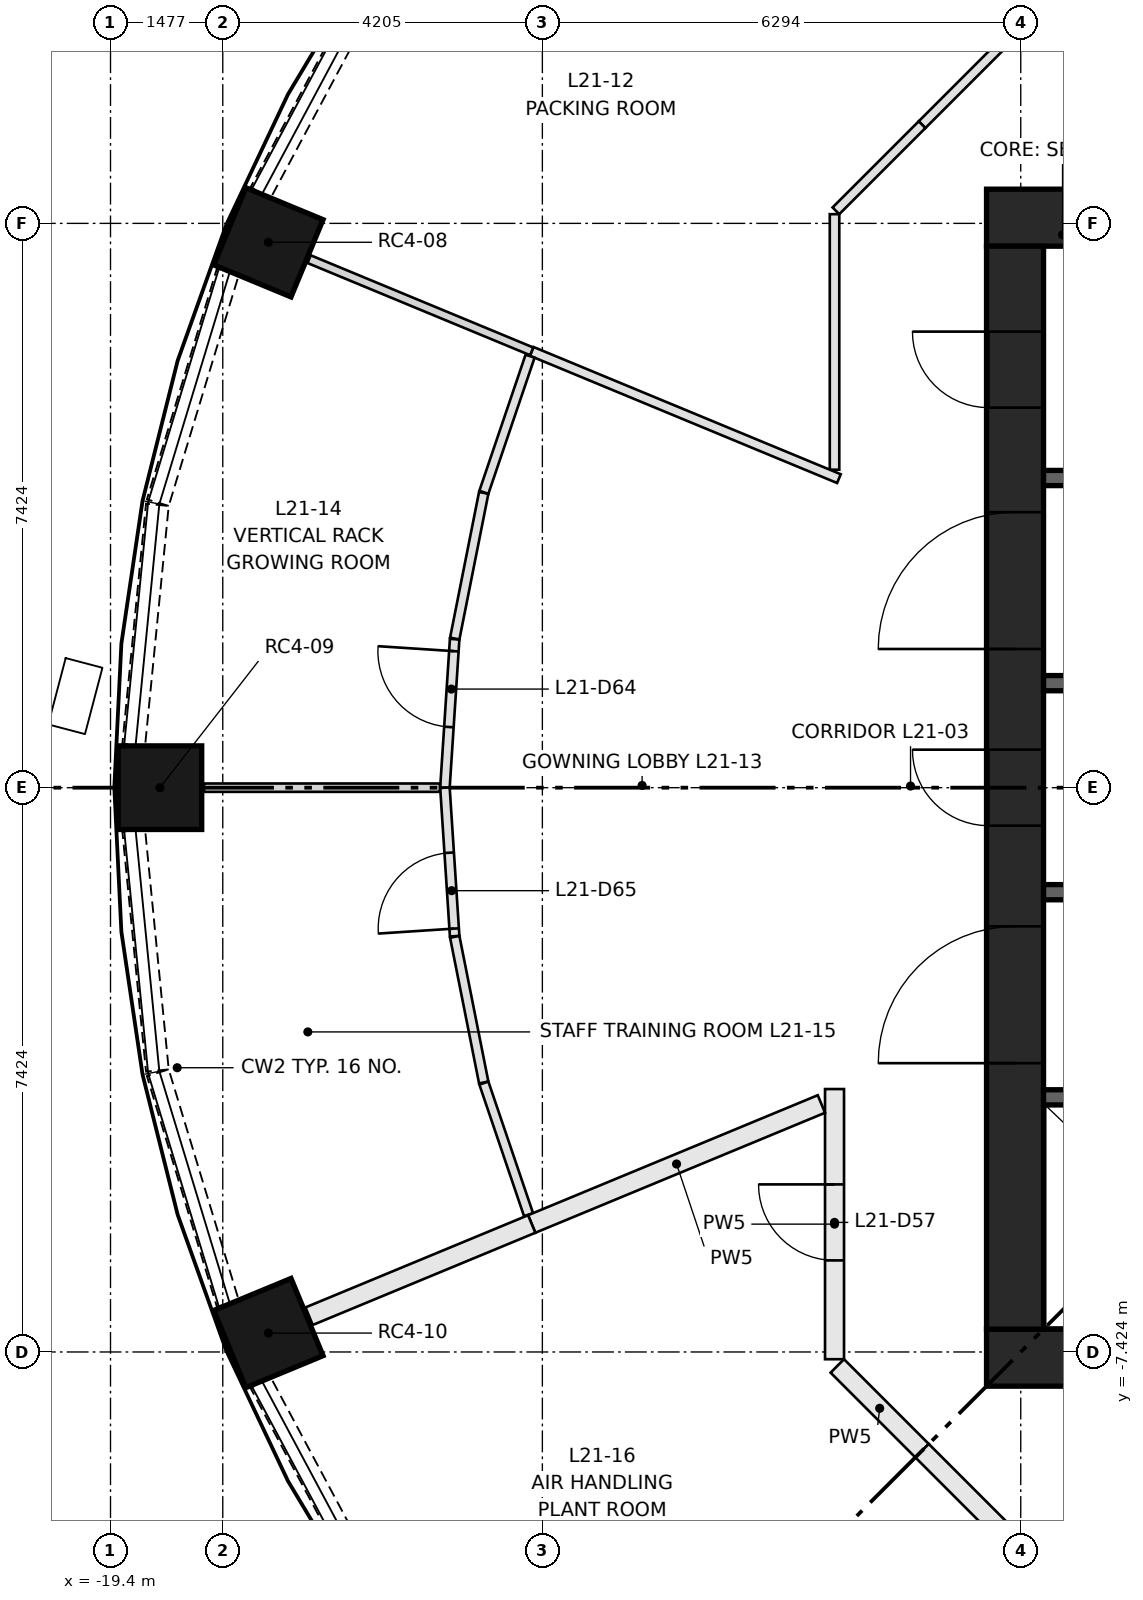
"""IFC4 building model, lengths in metres.
Left out: names, types, materials, properties, quantities, classifications, styles, units other than length and angle.
Written with IfcOpenShell. Run it as: python <this file> out.ifc"""

import sys

from ifc_helpers import new_model, si_unit, direction, frame, frame_2d, origin, origin_2d, place, context, subcontext, project, spatial, rectangle, extrude, element, fill, save


model = new_model("IFC4")
c1 = context("Model", 3, precision=1e-05, world=origin(), true_north=direction((0.0, 1.0)))
c2 = subcontext(c1, "Body", "Model", "MODEL_VIEW")
j1 = project(units=[si_unit("LENGTHUNIT", "METRE"), si_unit("PLANEANGLEUNIT", "RADIAN")], contexts=[c1])
p1 = place(None, origin())
s1 = spatial("IfcSite", under=j1, at=p1, CompositionType="ELEMENT")
p2 = place(p1, origin())
s2 = spatial("IfcBuilding", under=s1, at=p2, CompositionType="ELEMENT")
p3 = place(p2, frame((0.0, 0.0, 83.7)))
s3 = spatial("IfcBuildingStorey", under=s2, at=p3, CompositionType="ELEMENT", Elevation=83.7)
for number, where, z_axis, x_axis in (
    (1, (-17.323, 7.175, 0.0), (0.0, 0.0, 1.0), (-0.924, 0.383, 0.0)),
    (2, (-18.75, 0.0, 0.0), (0.0, 0.0, 1.0), (-1.0, 0.0, 0.0)),
    (3, (-17.323, -7.175, 0.0), (0.0, 0.0, 1.0), (-0.924, -0.383, 0.0)),
):
    element("IfcColumn", number, at=place(p3, frame(where, z_axis=z_axis, x_axis=x_axis)), inside=s3, PredefinedType="COLUMN", context=c2, shape_type="SweptSolid", body=[
        extrude(rectangle(XDim=1.1, YDim=1.1, at=origin_2d()), origin(), (0.0, 0.0, 1.0), 3.65),
    ])
for number, where, z_axis, x_axis in (
    (4, (-7.874, -7.499, 0.0), (0.0, 0.0, 1.0), (1.0, 0.0, 0.0)),
    (5, (-7.874, 7.499, 0.0), (0.0, 0.0, 1.0), (1.0, 0.0, 0.0)),
):
    element("IfcWall", number, at=place(p3, frame(where, z_axis=z_axis, x_axis=x_axis)), inside=s3, PredefinedType="SHEAR", context=c2, shape_type="SweptSolid", body=[
        extrude(rectangle(XDim=15.748, YDim=0.75, at=frame_2d((7.874, 0.0))), origin(), (0.0, 0.0, 1.0), 3.65),
    ])
p4 = place(p3, frame((-7.499, -7.124, 0.0), z_axis=(0.0, 0.0, 1.0), x_axis=(0.0, 1.0, 0.0)))
e6 = element("IfcWall", 6, at=p4, inside=s3, PredefinedType="SHEAR", context=c2, shape_type="SweptSolid", body=[
    extrude(rectangle(XDim=14.248, YDim=0.75, at=frame_2d((7.124, 0.0))), origin(), (0.0, 0.0, 1.0), 3.65),
])
p5 = place(p4, frame((6.624, 0.0, 0.0)))
e7 = element("IfcOpeningElement", 7, at=p5, cuts=e6, PredefinedType="OPENING", context=c2, shape_type="SweptSolid", body=[
    extrude(rectangle(XDim=1.0, YDim=2.1, at=frame_2d((0.5, 1.05))), frame((0.0, 0.385, 0.0), z_axis=(0.0, -1.0, 0.0), x_axis=(1.0, 0.0, 0.0)), (0.0, 0.0, 1.0), 0.77),
])
p6 = place(p4, frame((3.5, 0.0, 0.0)))
e8 = element("IfcOpeningElement", 8, at=p6, cuts=e6, PredefinedType="OPENING", context=c2, shape_type="SweptSolid", body=[
    extrude(rectangle(XDim=1.8, YDim=2.1, at=frame_2d((0.9, 1.05))), frame((0.0, 0.385, 0.0), z_axis=(0.0, -1.0, 0.0), x_axis=(1.0, 0.0, 0.0)), (0.0, 0.0, 1.0), 0.77),
])
p7 = place(p4, frame((8.948, 0.0, 0.0)))
e9 = element("IfcOpeningElement", 9, at=p7, cuts=e6, PredefinedType="OPENING", context=c2, shape_type="SweptSolid", body=[
    extrude(rectangle(XDim=1.8, YDim=2.1, at=frame_2d((0.9, 1.05))), frame((0.0, 0.385, 0.0), z_axis=(0.0, -1.0, 0.0), x_axis=(1.0, 0.0, 0.0)), (0.0, 0.0, 1.0), 0.77),
])
p8 = place(p4, frame((12.124, 0.0, 0.0)))
e10 = element("IfcOpeningElement", 10, at=p8, cuts=e6, PredefinedType="OPENING", context=c2, shape_type="SweptSolid", body=[
    extrude(rectangle(XDim=1.0, YDim=2.1, at=frame_2d((0.5, 1.05))), frame((0.0, 0.385, 0.0), z_axis=(0.0, -1.0, 0.0), x_axis=(1.0, 0.0, 0.0)), (0.0, 0.0, 1.0), 0.77),
])
p9 = place(p3, frame((-7.124, -4.074, 0.0), z_axis=(0.0, 0.0, 1.0), x_axis=(1.0, 0.0, 0.0)))
e11 = element("IfcWall", 11, at=p9, inside=s3, PredefinedType="SHEAR", context=c2, shape_type="SweptSolid", body=[
    extrude(rectangle(XDim=14.248, YDim=0.2, at=frame_2d((7.124, 0.0))), origin(), (0.0, 0.0, 1.0), 3.3),
])
p10 = place(p9, frame((1.069, 0.0, 0.0)))
e12 = element("IfcOpeningElement", 12, at=p10, cuts=e11, PredefinedType="OPENING", context=c2, shape_type="SweptSolid", body=[
    extrude(rectangle(XDim=1.1, YDim=2.1, at=frame_2d((0.55, 1.05))), frame((0.0, 0.11, 0.0), z_axis=(0.0, -1.0, 0.0), x_axis=(1.0, 0.0, 0.0)), (0.0, 0.0, 1.0), 0.22),
])
p11 = place(p9, frame((4.206, 0.0, 0.0)))
e13 = element("IfcOpeningElement", 13, at=p11, cuts=e11, PredefinedType="OPENING", context=c2, shape_type="SweptSolid", body=[
    extrude(rectangle(XDim=1.1, YDim=2.1, at=frame_2d((0.55, 1.05))), frame((0.0, 0.11, 0.0), z_axis=(0.0, -1.0, 0.0), x_axis=(1.0, 0.0, 0.0)), (0.0, 0.0, 1.0), 0.22),
])
p12 = place(p9, frame((6.808, 0.0, 0.0)))
e14 = element("IfcOpeningElement", 14, at=p12, cuts=e11, PredefinedType="OPENING", context=c2, shape_type="SweptSolid", body=[
    extrude(rectangle(XDim=1.0, YDim=2.1, at=frame_2d((0.5, 1.05))), frame((0.0, 0.11, 0.0), z_axis=(0.0, -1.0, 0.0), x_axis=(1.0, 0.0, 0.0)), (0.0, 0.0, 1.0), 0.22),
])
p13 = place(p9, frame((8.777, 0.0, 0.0)))
e15 = element("IfcOpeningElement", 15, at=p13, cuts=e11, PredefinedType="OPENING", context=c2, shape_type="SweptSolid", body=[
    extrude(rectangle(XDim=1.0, YDim=2.1, at=frame_2d((0.5, 1.05))), frame((0.0, 0.11, 0.0), z_axis=(0.0, -1.0, 0.0), x_axis=(1.0, 0.0, 0.0)), (0.0, 0.0, 1.0), 0.22),
])
p14 = place(p9, frame((10.745, 0.0, 0.0)))
e16 = element("IfcOpeningElement", 16, at=p14, cuts=e11, PredefinedType="OPENING", context=c2, shape_type="SweptSolid", body=[
    extrude(rectangle(XDim=1.0, YDim=2.1, at=frame_2d((0.5, 1.05))), frame((0.0, 0.11, 0.0), z_axis=(0.0, -1.0, 0.0), x_axis=(1.0, 0.0, 0.0)), (0.0, 0.0, 1.0), 0.22),
])
p15 = place(p9, frame((12.714, 0.0, 0.0)))
e17 = element("IfcOpeningElement", 17, at=p15, cuts=e11, PredefinedType="OPENING", context=c2, shape_type="SweptSolid", body=[
    extrude(rectangle(XDim=1.0, YDim=2.1, at=frame_2d((0.5, 1.05))), frame((0.0, 0.11, 0.0), z_axis=(0.0, -1.0, 0.0), x_axis=(1.0, 0.0, 0.0)), (0.0, 0.0, 1.0), 0.22),
])
p16 = place(p3, frame((-7.124, 4.074, 0.0), z_axis=(0.0, 0.0, 1.0), x_axis=(1.0, 0.0, 0.0)))
e18 = element("IfcWall", 18, at=p16, inside=s3, PredefinedType="SHEAR", context=c2, shape_type="SweptSolid", body=[
    extrude(rectangle(XDim=7.124, YDim=0.2, at=frame_2d((3.562, 0.0))), origin(), (0.0, 0.0, 1.0), 3.3),
])
for number, where, z_axis, x_axis in (
    (19, (-7.124, -1.375, 0.0), (0.0, 0.0, 1.0), (1.0, 0.0, 0.0)),
    (20, (-7.124, 1.375, 0.0), (0.0, 0.0, 1.0), (1.0, 0.0, 0.0)),
):
    element("IfcWall", number, at=place(p3, frame(where, z_axis=z_axis, x_axis=x_axis)), inside=s3, PredefinedType="SHEAR", context=c2, shape_type="SweptSolid", body=[
        extrude(rectangle(XDim=2.75, YDim=0.2, at=frame_2d((1.375, 0.0))), origin(), (0.0, 0.0, 1.0), 3.3),
    ])
p17 = place(p3, frame((-15.929, 10.626, 0.0), z_axis=(0.0, 0.0, 1.0), x_axis=(-0.471458802606, -0.88188808669, 0.0)))
e21 = element("IfcWall", 21, at=p17, inside=s3, PredefinedType="SOLIDWALL", context=c2, shape_type="SweptSolid", body=[
    extrude(rectangle(XDim=3.172, YDim=0.3, at=frame_2d((1.586, 0.0))), origin(), (0.0, 0.0, 1.0), 0.9),
])
p18 = place(p3, frame((-17.856, 6.787, 0.0), z_axis=(0.0, 0.0, 1.0), x_axis=(-0.290325591482, -0.956927923582, 0.0)))
e22 = element("IfcWall", 22, at=p18, inside=s3, PredefinedType="SOLIDWALL", context=c2, shape_type="SweptSolid", body=[
    extrude(rectangle(XDim=3.173, YDim=0.3, at=frame_2d((1.586, 0.0))), origin(), (0.0, 0.0, 1.0), 0.9),
])
for number, where, z_axis, x_axis in (
    (23, (-18.783, 3.721, 0.0), (0.0, 0.0, 1.0), (-0.098, -0.995, 0.0)),
    (24, (-19.094, -0.564, 0.0), (0.0, 0.0, 1.0), (0.098, -0.995, 0.0)),
):
    element("IfcWall", number, at=place(p3, frame(where, z_axis=z_axis, x_axis=x_axis)), inside=s3, PredefinedType="SOLIDWALL", context=c2, shape_type="SweptSolid", body=[
        extrude(rectangle(XDim=3.173, YDim=0.3, at=frame_2d((1.586, 0.0))), origin(), (0.0, 0.0, 1.0), 0.9),
    ])
p19 = place(p3, frame((-18.778, -3.75, 0.0), z_axis=(0.0, 0.0, 1.0), x_axis=(0.290325591482, -0.956927923582, 0.0)))
e25 = element("IfcWall", 25, at=p19, inside=s3, PredefinedType="SOLIDWALL", context=c2, shape_type="SweptSolid", body=[
    extrude(rectangle(XDim=3.173, YDim=0.3, at=frame_2d((1.586, 0.0))), origin(), (0.0, 0.0, 1.0), 0.9),
])
p20 = place(p3, frame((-17.425, -7.828, 0.0), z_axis=(0.0, 0.0, 1.0), x_axis=(0.471458802606, -0.88188808669, 0.0)))
e26 = element("IfcWall", 26, at=p20, inside=s3, PredefinedType="SOLIDWALL", context=c2, shape_type="SweptSolid", body=[
    extrude(rectangle(XDim=3.172, YDim=0.3, at=frame_2d((1.586, 0.0))), origin(), (0.0, 0.0, 1.0), 0.9),
])
p21 = place(p3, frame((-8.722, 8.722, 0.0), z_axis=(0.0, 0.0, 1.0), x_axis=(0.707030604857, 0.70718294931, 0.0)))
e27 = element("IfcWall", 27, at=p21, inside=s3, PredefinedType="PARTITIONING", context=c2, shape_type="SweptSolid", body=[
    extrude(rectangle(XDim=1.603, YDim=0.125, at=frame_2d((0.801, 0.0))), origin(), (0.0, 0.0, 1.0), 3.3),
])
p22 = place(p3, frame((-9.874, 4.183, 0.0), z_axis=(0.0, 0.0, 1.0), x_axis=(0.0, 1.0, 0.0)))
e28 = element("IfcWall", 28, at=p22, inside=s3, PredefinedType="PARTITIONING", context=c2, shape_type="SweptSolid", body=[
    extrude(rectangle(XDim=3.362, YDim=0.125, at=frame_2d((1.681, 0.0))), origin(), (0.0, 0.0, 1.0), 3.3),
])
p23 = place(p3, frame((-9.856, 7.589, 0.0), z_axis=(0.0, 0.0, 1.0), x_axis=(0.70718294931, 0.707030604857, 0.0)))
e29 = element("IfcWall", 29, at=p23, inside=s3, PredefinedType="PARTITIONING", context=c2, shape_type="SweptSolid", body=[
    extrude(rectangle(XDim=1.603, YDim=0.125, at=frame_2d((0.801, 0.0))), origin(), (0.0, 0.0, 1.0), 3.3),
])
p24 = place(p3, frame((-9.874, -7.519, 0.0), z_axis=(0.0, 0.0, 1.0), x_axis=(0.0, 1.0, 0.0)))
e30 = element("IfcWall", 30, at=p24, inside=s3, PredefinedType="PARTITIONING", context=c2, shape_type="SweptSolid", body=[
    extrude(rectangle(XDim=3.554, YDim=0.25, at=frame_2d((1.777, 0.0))), origin(), (0.0, 0.0, 1.0), 3.3),
])
p25 = place(p24, frame((1.3, 0.0, 0.0)))
e31 = element("IfcOpeningElement", 31, at=p25, cuts=e30, PredefinedType="OPENING", context=c2, shape_type="SweptSolid", body=[
    extrude(rectangle(XDim=1.0, YDim=2.1, at=frame_2d((0.5, 1.05))), frame((0.0, 0.135, 0.0), z_axis=(0.0, -1.0, 0.0), x_axis=(1.0, 0.0, 0.0)), (0.0, 0.0, 1.0), 0.27),
])
for number, where, z_axis, x_axis in (
    (32, (-8.722, -8.722, 0.0), (0.0, 0.0, 1.0), (-0.707, 0.707, 0.0)),
    (33, (-7.608, -9.837, 0.0), (0.0, 0.0, 1.0), (-0.707, 0.707, 0.0)),
):
    element("IfcWall", number, at=place(p3, frame(where, z_axis=z_axis, x_axis=x_axis)), inside=s3, PredefinedType="PARTITIONING", context=c2, shape_type="SweptSolid", body=[
        extrude(rectangle(XDim=1.577, YDim=0.25, at=frame_2d((0.788, 0.0))), origin(), (0.0, 0.0, 1.0), 3.3),
    ])
p26 = place(p3, frame((-9.816, 4.066, 0.0), z_axis=(0.0, 0.0, 1.0), x_axis=(-0.923865829688, 0.382716512232, 0.0)))
e34 = element("IfcWall", 34, at=p26, inside=s3, PredefinedType="PARTITIONING", context=c2, shape_type="SweptSolid", body=[
    extrude(rectangle(XDim=4.375, YDim=0.125, at=frame_2d((2.188, 0.0))), origin(), (0.0, 0.0, 1.0), 3.3),
])
p27 = place(p3, frame((-13.858, 5.74, 0.0), z_axis=(0.0, 0.0, 1.0), x_axis=(-0.923876970079, 0.382689618566, 0.0)))
e35 = element("IfcWall", 35, at=p27, inside=s3, PredefinedType="PARTITIONING", context=c2, shape_type="SweptSolid", body=[
    extrude(rectangle(XDim=3.17, YDim=0.11, at=frame_2d((1.585, 0.0))), origin(), (0.0, 0.0, 1.0), 3.3),
])
p28 = place(p3, frame((-15.0, 0.0, 0.0), z_axis=(0.0, 0.0, 1.0), x_axis=(0.065335548621, 0.997863350407, 0.0)))
e36 = element("IfcWall", 36, at=p28, inside=s3, PredefinedType="PARTITIONING", context=c2, shape_type="SweptSolid", body=[
    extrude(rectangle(XDim=1.958, YDim=0.125, at=frame_2d((0.979, 0.0))), origin(), (0.0, 0.0, 1.0), 3.3),
])
p29 = place(p28, frame((0.8, 0.0, 0.0)))
e37 = element("IfcOpeningElement", 37, at=p29, cuts=e36, PredefinedType="OPENING", context=c2, shape_type="SweptSolid", body=[
    extrude(rectangle(XDim=1.0, YDim=2.1, at=frame_2d((0.5, 1.05))), frame((0.0, 0.073, 0.0), z_axis=(0.0, -1.0, 0.0), x_axis=(1.0, 0.0, 0.0)), (0.0, 0.0, 1.0), 0.145),
])
p30 = place(p3, frame((-14.871, 1.962, 0.0), z_axis=(0.0, 0.0, 1.0), x_axis=(0.195034785279, 0.980796325713, 0.0)))
e38 = element("IfcWall", 38, at=p30, inside=s3, PredefinedType="PARTITIONING", context=c2, shape_type="SweptSolid", body=[
    extrude(rectangle(XDim=1.954, YDim=0.125, at=frame_2d((0.977, 0.0))), origin(), (0.0, 0.0, 1.0), 3.3),
])
p31 = place(p3, frame((-14.488, 3.886, 0.0), z_axis=(0.0, 0.0, 1.0), x_axis=(0.321451389675, 0.946926081633, 0.0)))
e39 = element("IfcWall", 39, at=p31, inside=s3, PredefinedType="PARTITIONING", context=c2, shape_type="SweptSolid", body=[
    extrude(rectangle(XDim=1.891, YDim=0.125, at=frame_2d((0.946, 0.0))), origin(), (0.0, 0.0, 1.0), 3.3),
])
p32 = place(p3, frame((-14.872, -1.954, 0.0), z_axis=(0.0, 0.0, 1.0), x_axis=(-0.065335548621, 0.997863350407, 0.0)))
e40 = element("IfcWall", 40, at=p32, inside=s3, PredefinedType="PARTITIONING", context=c2, shape_type="SweptSolid", body=[
    extrude(rectangle(XDim=1.958, YDim=0.125, at=frame_2d((0.979, 0.0))), origin(), (0.0, 0.0, 1.0), 3.3),
])
p33 = place(p32, frame((0.1, 0.0, 0.0)))
e41 = element("IfcOpeningElement", 41, at=p33, cuts=e40, PredefinedType="OPENING", context=c2, shape_type="SweptSolid", body=[
    extrude(rectangle(XDim=1.0, YDim=2.1, at=frame_2d((0.5, 1.05))), frame((0.0, 0.073, 0.0), z_axis=(0.0, -1.0, 0.0), x_axis=(1.0, 0.0, 0.0)), (0.0, 0.0, 1.0), 0.145),
])
p34 = place(p3, frame((-14.49, -3.878, 0.0), z_axis=(0.0, 0.0, 1.0), x_axis=(-0.195034785279, 0.980796325713, 0.0)))
e42 = element("IfcWall", 42, at=p34, inside=s3, PredefinedType="PARTITIONING", context=c2, shape_type="SweptSolid", body=[
    extrude(rectangle(XDim=1.954, YDim=0.125, at=frame_2d((0.977, 0.0))), origin(), (0.0, 0.0, 1.0), 3.3),
])
p35 = place(p3, frame((-13.9, -5.618, 0.0), z_axis=(0.0, 0.0, 1.0), x_axis=(-0.321390424162, 0.946946775303, 0.0)))
e43 = element("IfcWall", 43, at=p35, inside=s3, PredefinedType="PARTITIONING", context=c2, shape_type="SweptSolid", body=[
    extrude(rectangle(XDim=1.828, YDim=0.125, at=frame_2d((0.914, 0.0))), origin(), (0.0, 0.0, 1.0), 3.3),
])
p36 = place(p3, frame((-10.047, -4.162, 0.0), z_axis=(0.0, 0.0, 1.0), x_axis=(-0.92388555685, -0.382668888001, 0.0)))
e44 = element("IfcWall", 44, at=p36, inside=s3, PredefinedType="PARTITIONING", context=c2, shape_type="SweptSolid", body=[
    extrude(rectangle(XDim=4.125, YDim=0.25, at=frame_2d((2.062, 0.0))), origin(), (0.0, 0.0, 1.0), 3.3),
])
p37 = place(p3, frame((-15.066, 0.0, 0.0), z_axis=(0.0, 0.0, 1.0), x_axis=(-1.0, 0.0, 0.0)))
e45 = element("IfcWall", 45, at=p37, inside=s3, PredefinedType="PARTITIONING", context=c2, shape_type="SweptSolid", body=[
    extrude(rectangle(XDim=3.104, YDim=0.11, at=frame_2d((1.552, 0.0))), origin(), (0.0, 0.0, 1.0), 3.3),
])
p38 = place(p3, frame((-13.858, -5.74, 0.0), z_axis=(0.0, 0.0, 1.0), x_axis=(-0.923876970079, -0.382689618566, 0.0)))
e46 = element("IfcWall", 46, at=p38, inside=s3, PredefinedType="PARTITIONING", context=c2, shape_type="SweptSolid", body=[
    extrude(rectangle(XDim=3.17, YDim=0.25, at=frame_2d((1.585, 0.0))), origin(), (0.0, 0.0, 1.0), 3.3),
])
p39 = place(p5, origin())
e47 = element("IfcDoor", 47, at=p39, inside=s3, OperationType="SINGLE_SWING_RIGHT", PredefinedType="DOOR", context=c2, shape_type="SweptSolid", body=[
    extrude(rectangle(XDim=1.0, YDim=2.1, at=frame_2d((0.5, 1.05))), frame((0.0, 0.375, 0.0), z_axis=(0.0, -1.0, 0.0), x_axis=(1.0, 0.0, 0.0)), (0.0, 0.0, 1.0), 0.05),
])
fill(e7, e47)
p40 = place(p6, origin())
e48 = element("IfcDoor", 48, at=p40, inside=s3, OperationType="DOUBLE_DOOR_SINGLE_SWING", PredefinedType="DOOR", context=c2, shape_type="SweptSolid", body=[
    extrude(rectangle(XDim=1.8, YDim=2.1, at=frame_2d((0.9, 1.05))), frame((0.0, 0.025, 0.0), z_axis=(0.0, -1.0, 0.0), x_axis=(1.0, 0.0, 0.0)), (0.0, 0.0, 1.0), 0.05),
])
fill(e8, e48)
p41 = place(p7, origin())
e49 = element("IfcDoor", 49, at=p41, inside=s3, OperationType="DOUBLE_DOOR_SINGLE_SWING", PredefinedType="DOOR", context=c2, shape_type="SweptSolid", body=[
    extrude(rectangle(XDim=1.8, YDim=2.1, at=frame_2d((0.9, 1.05))), frame((0.0, 0.025, 0.0), z_axis=(0.0, -1.0, 0.0), x_axis=(1.0, 0.0, 0.0)), (0.0, 0.0, 1.0), 0.05),
])
fill(e9, e49)
p42 = place(p8, origin())
e50 = element("IfcDoor", 50, at=p42, inside=s3, OperationType="SINGLE_SWING_RIGHT", PredefinedType="DOOR", context=c2, shape_type="SweptSolid", body=[
    extrude(rectangle(XDim=1.0, YDim=2.1, at=frame_2d((0.5, 1.05))), frame((0.0, 0.375, 0.0), z_axis=(0.0, -1.0, 0.0), x_axis=(1.0, 0.0, 0.0)), (0.0, 0.0, 1.0), 0.05),
])
fill(e10, e50)
p43 = place(p25, origin())
e51 = element("IfcDoor", 51, at=p43, inside=s3, OperationType="SINGLE_SWING_RIGHT", PredefinedType="DOOR", context=c2, shape_type="SweptSolid", body=[
    extrude(rectangle(XDim=1.0, YDim=2.1, at=frame_2d((0.5, 1.05))), frame((0.0, 0.025, 0.0), z_axis=(0.0, -1.0, 0.0), x_axis=(1.0, 0.0, 0.0)), (0.0, 0.0, 1.0), 0.05),
])
fill(e31, e51)
p44 = place(p29, origin())
e52 = element("IfcDoor", 52, at=p44, inside=s3, OperationType="SINGLE_SWING_RIGHT", PredefinedType="DOOR", context=c2, shape_type="SweptSolid", body=[
    extrude(rectangle(XDim=1.0, YDim=2.1, at=frame_2d((0.5, 1.05))), frame((0.0, 0.025, 0.0), z_axis=(0.0, -1.0, 0.0), x_axis=(1.0, 0.0, 0.0)), (0.0, 0.0, 1.0), 0.05),
])
fill(e37, e52)
p45 = place(p33, origin())
e53 = element("IfcDoor", 53, at=p45, inside=s3, OperationType="SINGLE_SWING_LEFT", PredefinedType="DOOR", context=c2, shape_type="SweptSolid", body=[
    extrude(rectangle(XDim=1.0, YDim=2.1, at=frame_2d((0.5, 1.05))), frame((0.0, 0.025, 0.0), z_axis=(0.0, -1.0, 0.0), x_axis=(1.0, 0.0, 0.0)), (0.0, 0.0, 1.0), 0.05),
])
fill(e41, e53)
save(model, sys.argv[1])
